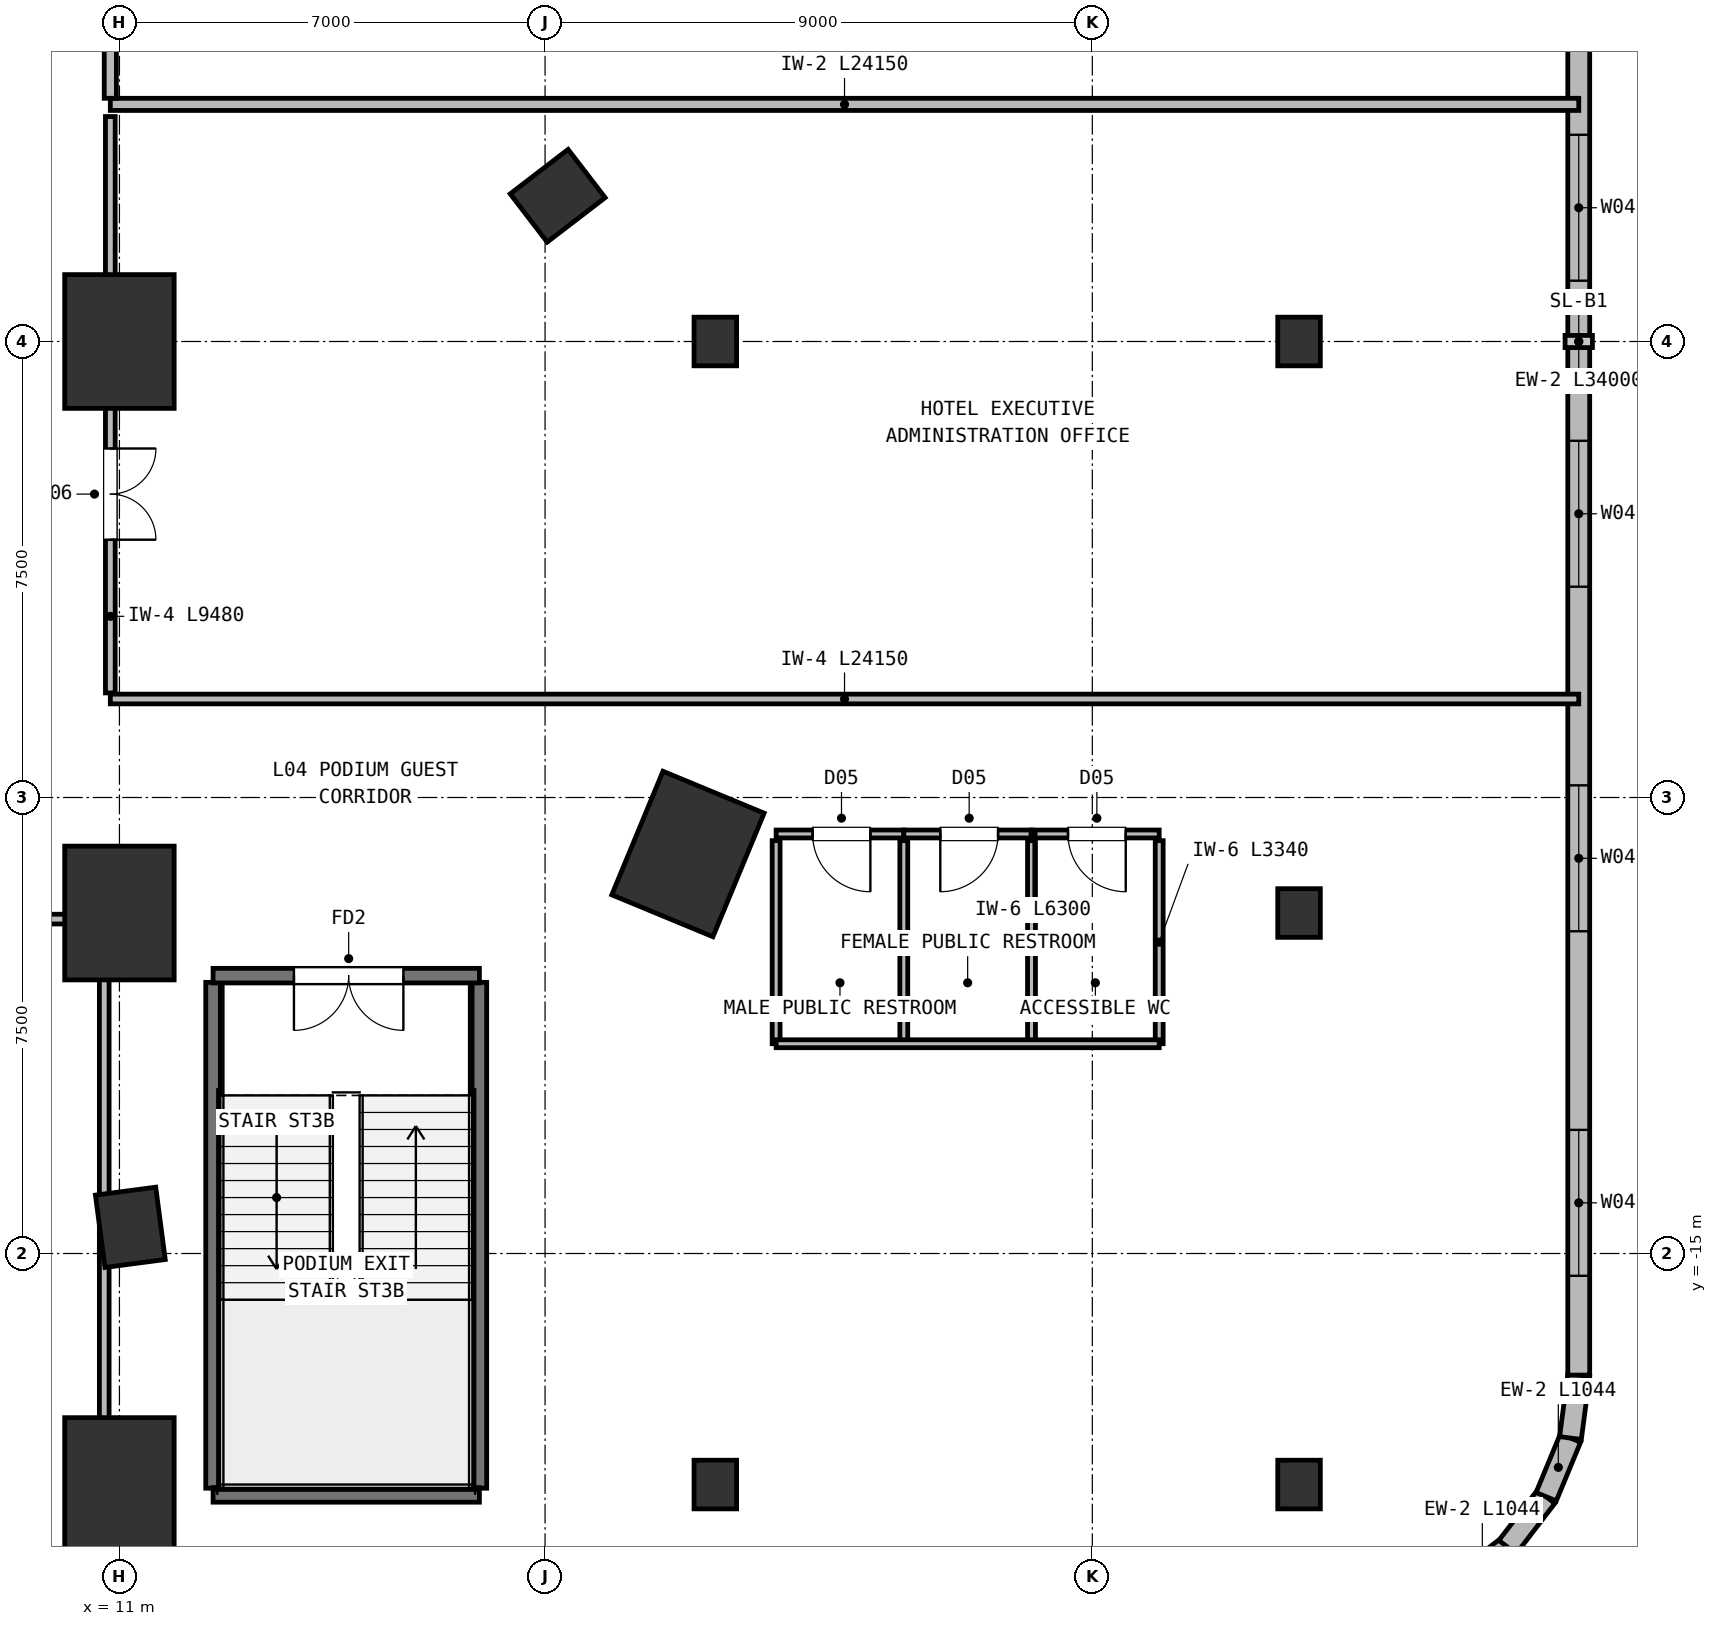
"""IFC4 building model, lengths in metres.
Left out: names, types, materials, properties, quantities, classifications, styles, units other than length and angle.
Written with IfcOpenShell. Run it as: python <this file> out.ifc"""

import sys

from ifc_helpers import new_model, si_unit, direction, frame, frame_2d, origin, origin_2d, place, context, subcontext, project, spatial, rectangle, extrude, element, fill, save


model = new_model("IFC4")
c1 = context("Model", 3, precision=1e-05, world=origin(), true_north=direction((0.0, 1.0)))
c2 = subcontext(c1, "Body", "Model", "MODEL_VIEW")
j1 = project(units=[si_unit("LENGTHUNIT", "METRE"), si_unit("PLANEANGLEUNIT", "RADIAN")], contexts=[c1])
p1 = place(None, origin())
s1 = spatial("IfcSite", under=j1, at=p1, CompositionType="ELEMENT")
p2 = place(p1, origin())
s2 = spatial("IfcBuilding", under=s1, at=p2, CompositionType="ELEMENT")
p3 = place(p2, frame((0.0, 0.0, 21.5)))
s3 = spatial("IfcBuildingStorey", under=s2, at=p3, CompositionType="ELEMENT", Elevation=21.5)
p4 = place(p3, frame((11.179, -14.569, 0.0), z_axis=(0.0, 0.0, 1.0), x_axis=(0.991444861374, 0.13052619222, 0.0)))
e1 = element("IfcColumn", 1, at=p4, inside=s3, PredefinedType="COLUMN", context=c2, shape_type="SweptSolid", body=[
    extrude(rectangle(XDim=1.0, YDim=1.2, at=origin_2d()), origin(), (0.0, 0.0, 1.0), 4.5),
])
p5 = place(p3, frame((20.35, -8.429, 0.0), z_axis=(0.0, 0.0, 1.0), x_axis=(-0.923879532511, 0.382683432365, 0.0)))
e2 = element("IfcColumn", 2, at=p5, inside=s3, PredefinedType="COLUMN", context=c2, shape_type="SweptSolid", body=[
    extrude(rectangle(XDim=1.8, YDim=2.2, at=origin_2d()), origin(), (0.0, 0.0, 1.0), 4.5),
])
p6 = place(p3, frame((18.207, 2.397, 0.0), z_axis=(0.0, 0.0, 1.0), x_axis=(-0.608761429009, 0.793353340291, 0.0)))
e3 = element("IfcColumn", 3, at=p6, inside=s3, PredefinedType="COLUMN", context=c2, shape_type="SweptSolid", body=[
    extrude(rectangle(XDim=1.0, YDim=1.2, at=origin_2d()), origin(), (0.0, 0.0, 1.0), 4.5),
])
for number, where, z_axis, x_axis in (
    (4, (11.0, -18.8, 0.0), (0.0, 0.0, 1.0), (1.0, 0.0, 0.0)),
    (5, (11.0, -9.4, 0.0), (0.0, 0.0, 1.0), (1.0, 0.0, 0.0)),
    (6, (11.0, 0.0, 0.0), (0.0, 0.0, 1.0), (1.0, 0.0, 0.0)),
):
    element("IfcColumn", number, at=place(p3, frame(where, z_axis=z_axis, x_axis=x_axis)), inside=s3, PredefinedType="COLUMN", context=c2, shape_type="SweptSolid", body=[
        extrude(rectangle(XDim=1.8, YDim=2.2, at=origin_2d()), origin(), (0.0, 0.0, 1.0), 4.5),
    ])
for number, where, z_axis, x_axis in (
    (7, (20.8, -18.8, 0.0), (0.0, 0.0, 1.0), (1.0, 0.0, 0.0)),
    (8, (20.8, 0.0, 0.0), (0.0, 0.0, 1.0), (1.0, 0.0, 0.0)),
    (9, (30.4, -18.8, 0.0), (0.0, 0.0, 1.0), (1.0, 0.0, 0.0)),
    (10, (30.4, -9.4, 0.0), (0.0, 0.0, 1.0), (1.0, 0.0, 0.0)),
    (11, (30.4, 0.0, 0.0), (0.0, 0.0, 1.0), (1.0, 0.0, 0.0)),
):
    element("IfcColumn", number, at=place(p3, frame(where, z_axis=z_axis, x_axis=x_axis)), inside=s3, PredefinedType="COLUMN", context=c2, shape_type="SweptSolid", body=[
        extrude(rectangle(XDim=0.7, YDim=0.8, at=origin_2d()), origin(), (0.0, 0.0, 1.0), 4.5),
    ])
for number, where, z_axis, x_axis in (
    (12, (33.828, -19.828, 0.0), (0.0, 0.0, 1.0), (-0.793, -0.609, 0.0)),
    (13, (34.464, -19.0, 0.0), (0.0, 0.0, 1.0), (-0.609, -0.793, 0.0)),
    (14, (34.864, -18.035, 0.0), (0.0, 0.0, 1.0), (-0.383, -0.924, 0.0)),
):
    element("IfcWall", number, at=place(p3, frame(where, z_axis=z_axis, x_axis=x_axis)), inside=s3, PredefinedType="SOLIDWALL", context=c2, shape_type="SweptSolid", body=[
        extrude(rectangle(XDim=1.044, YDim=0.36, at=frame_2d((0.522, 0.0))), origin(), (0.0, 0.0, 1.0), 4.22),
    ])
p7 = place(p3, frame((35.0, -17.0, 0.0), z_axis=(0.0, 0.0, 1.0), x_axis=(-0.130448465198, -0.991455091231, 0.0)))
e15 = element("IfcWall", 15, at=p7, inside=s3, PredefinedType="SOLIDWALL", context=c2, shape_type="SweptSolid", body=[
    extrude(rectangle(XDim=1.044, YDim=0.36, at=frame_2d((0.522, 0.0))), origin(), (0.0, 0.0, 1.0), 4.22),
])
p8 = place(p3, frame((35.0, 17.0, 0.0), z_axis=(0.0, 0.0, 1.0), x_axis=(0.0, -1.0, 0.0)))
e16 = element("IfcWall", 16, at=p8, inside=s3, PredefinedType="SOLIDWALL", context=c2, shape_type="SweptSolid", body=[
    extrude(rectangle(XDim=34.0, YDim=0.36, at=frame_2d((17.0, 0.0))), origin(), (0.0, 0.0, 1.0), 4.22),
])
p9 = place(p8, frame((1.633, 0.0, 0.95)))
e17 = element("IfcOpeningElement", 17, at=p9, cuts=e16, PredefinedType="OPENING", context=c2, shape_type="SweptSolid", body=[
    extrude(rectangle(XDim=2.4, YDim=2.6, at=frame_2d((1.2, 1.3))), frame((0.0, 0.19, 0.0), z_axis=(0.0, -1.0, 0.0), x_axis=(1.0, 0.0, 0.0)), (0.0, 0.0, 1.0), 0.38),
])
p10 = place(p8, frame((7.3, 0.0, 0.95)))
e18 = element("IfcOpeningElement", 18, at=p10, cuts=e16, PredefinedType="OPENING", context=c2, shape_type="SweptSolid", body=[
    extrude(rectangle(XDim=2.4, YDim=2.6, at=frame_2d((1.2, 1.3))), frame((0.0, 0.19, 0.0), z_axis=(0.0, -1.0, 0.0), x_axis=(1.0, 0.0, 0.0)), (0.0, 0.0, 1.0), 0.38),
])
p11 = place(p8, frame((13.6, 0.0, 0.95)))
e19 = element("IfcOpeningElement", 19, at=p11, cuts=e16, PredefinedType="OPENING", context=c2, shape_type="SweptSolid", body=[
    extrude(rectangle(XDim=2.4, YDim=2.6, at=frame_2d((1.2, 1.3))), frame((0.0, 0.19, 0.0), z_axis=(0.0, -1.0, 0.0), x_axis=(1.0, 0.0, 0.0)), (0.0, 0.0, 1.0), 0.38),
])
p12 = place(p8, frame((18.633, 0.0, 0.95)))
e20 = element("IfcOpeningElement", 20, at=p12, cuts=e16, PredefinedType="OPENING", context=c2, shape_type="SweptSolid", body=[
    extrude(rectangle(XDim=2.4, YDim=2.6, at=frame_2d((1.2, 1.3))), frame((0.0, 0.19, 0.0), z_axis=(0.0, -1.0, 0.0), x_axis=(1.0, 0.0, 0.0)), (0.0, 0.0, 1.0), 0.38),
])
p13 = place(p8, frame((24.3, 0.0, 0.95)))
e21 = element("IfcOpeningElement", 21, at=p13, cuts=e16, PredefinedType="OPENING", context=c2, shape_type="SweptSolid", body=[
    extrude(rectangle(XDim=2.4, YDim=2.6, at=frame_2d((1.2, 1.3))), frame((0.0, 0.19, 0.0), z_axis=(0.0, -1.0, 0.0), x_axis=(1.0, 0.0, 0.0)), (0.0, 0.0, 1.0), 0.38),
])
p14 = place(p8, frame((29.967, 0.0, 0.95)))
e22 = element("IfcOpeningElement", 22, at=p14, cuts=e16, PredefinedType="OPENING", context=c2, shape_type="SweptSolid", body=[
    extrude(rectangle(XDim=2.4, YDim=2.6, at=frame_2d((1.2, 1.3))), frame((0.0, 0.19, 0.0), z_axis=(0.0, -1.0, 0.0), x_axis=(1.0, 0.0, 0.0)), (0.0, 0.0, 1.0), 0.38),
])
for number, where, z_axis, x_axis in (
    (23, (12.54, -18.86, 0.0), (0.0, 0.0, 1.0), (0.0, 1.0, 0.0)),
    (24, (16.92, -18.86, 0.0), (0.0, 0.0, 1.0), (0.0, 1.0, 0.0)),
):
    element("IfcWall", number, at=place(p3, frame(where, z_axis=z_axis, x_axis=x_axis)), inside=s3, PredefinedType="SHEAR", context=c2, shape_type="SweptSolid", body=[
        extrude(rectangle(XDim=8.32, YDim=0.24, at=frame_2d((4.16, 0.0))), origin(), (0.0, 0.0, 1.0), 4.22),
    ])
p15 = place(p3, frame((12.54, -18.97, 0.0), z_axis=(0.0, 0.0, 1.0), x_axis=(1.0, 0.0, 0.0)))
e25 = element("IfcWall", 25, at=p15, inside=s3, PredefinedType="SHEAR", context=c2, shape_type="SweptSolid", body=[
    extrude(rectangle(XDim=4.38, YDim=0.24, at=frame_2d((2.19, 0.0))), origin(), (0.0, 0.0, 1.0), 4.22),
])
p16 = place(p3, frame((16.92, -10.43, 0.0), z_axis=(0.0, 0.0, 1.0), x_axis=(-1.0, 0.0, 0.0)))
e26 = element("IfcWall", 26, at=p16, inside=s3, PredefinedType="SHEAR", context=c2, shape_type="SweptSolid", body=[
    extrude(rectangle(XDim=4.38, YDim=0.24, at=frame_2d((2.19, 0.0))), origin(), (0.0, 0.0, 1.0), 4.22),
])
p17 = place(p16, frame((1.25, 0.0, 0.0)))
e27 = element("IfcOpeningElement", 27, at=p17, cuts=e26, PredefinedType="OPENING", context=c2, shape_type="SweptSolid", body=[
    extrude(rectangle(XDim=1.8, YDim=2.2, at=frame_2d((0.9, 1.1))), frame((0.0, 0.13, 0.0), z_axis=(0.0, -1.0, 0.0), x_axis=(1.0, 0.0, 0.0)), (0.0, 0.0, 1.0), 0.26),
])
p18 = place(p3, frame((23.9, -8.1, 0.0), z_axis=(0.0, 0.0, 1.0), x_axis=(-1.0, 0.0, 0.0)))
e28 = element("IfcWall", 28, at=p18, inside=s3, PredefinedType="PARTITIONING", context=c2, shape_type="SweptSolid", body=[
    extrude(rectangle(XDim=2.1, YDim=0.13, at=frame_2d((1.05, 0.0))), origin(), (0.0, 0.0, 1.0), 4.22),
])
p19 = place(p18, frame((0.55, 0.0, 0.0)))
e29 = element("IfcOpeningElement", 29, at=p19, cuts=e28, PredefinedType="OPENING", context=c2, shape_type="SweptSolid", body=[
    extrude(rectangle(XDim=0.95, YDim=2.1, at=frame_2d((0.475, 1.05))), frame((0.0, 0.075, 0.0), z_axis=(0.0, -1.0, 0.0), x_axis=(1.0, 0.0, 0.0)), (0.0, 0.0, 1.0), 0.15),
])
p20 = place(p3, frame((21.8, -11.55, 0.0), z_axis=(0.0, 0.0, 1.0), x_axis=(0.0, 1.0, 0.0)))
e30 = element("IfcWall", 30, at=p20, inside=s3, PredefinedType="PARTITIONING", context=c2, shape_type="SweptSolid", body=[
    extrude(rectangle(XDim=3.34, YDim=0.13, at=frame_2d((1.67, 0.0))), origin(), (0.0, 0.0, 1.0), 4.22),
])
p21 = place(p3, frame((26.0, -8.1, 0.0), z_axis=(0.0, 0.0, 1.0), x_axis=(-1.0, 0.0, 0.0)))
e31 = element("IfcWall", 31, at=p21, inside=s3, PredefinedType="PARTITIONING", context=c2, shape_type="SweptSolid", body=[
    extrude(rectangle(XDim=2.1, YDim=0.13, at=frame_2d((1.05, 0.0))), origin(), (0.0, 0.0, 1.0), 4.22),
])
p22 = place(p21, frame((0.55, 0.0, 0.0)))
e32 = element("IfcOpeningElement", 32, at=p22, cuts=e31, PredefinedType="OPENING", context=c2, shape_type="SweptSolid", body=[
    extrude(rectangle(XDim=0.95, YDim=2.1, at=frame_2d((0.475, 1.05))), frame((0.0, 0.075, 0.0), z_axis=(0.0, -1.0, 0.0), x_axis=(1.0, 0.0, 0.0)), (0.0, 0.0, 1.0), 0.15),
])
p23 = place(p3, frame((23.9, -11.55, 0.0), z_axis=(0.0, 0.0, 1.0), x_axis=(0.0, 1.0, 0.0)))
e33 = element("IfcWall", 33, at=p23, inside=s3, PredefinedType="PARTITIONING", context=c2, shape_type="SweptSolid", body=[
    extrude(rectangle(XDim=3.34, YDim=0.13, at=frame_2d((1.67, 0.0))), origin(), (0.0, 0.0, 1.0), 4.22),
])
p24 = place(p3, frame((28.1, -8.1, 0.0), z_axis=(0.0, 0.0, 1.0), x_axis=(-1.0, 0.0, 0.0)))
e34 = element("IfcWall", 34, at=p24, inside=s3, PredefinedType="PARTITIONING", context=c2, shape_type="SweptSolid", body=[
    extrude(rectangle(XDim=2.1, YDim=0.13, at=frame_2d((1.05, 0.0))), origin(), (0.0, 0.0, 1.0), 4.22),
])
p25 = place(p24, frame((0.55, 0.0, 0.0)))
e35 = element("IfcOpeningElement", 35, at=p25, cuts=e34, PredefinedType="OPENING", context=c2, shape_type="SweptSolid", body=[
    extrude(rectangle(XDim=0.95, YDim=2.1, at=frame_2d((0.475, 1.05))), frame((0.0, 0.075, 0.0), z_axis=(0.0, -1.0, 0.0), x_axis=(1.0, 0.0, 0.0)), (0.0, 0.0, 1.0), 0.15),
])
for number, where, z_axis, x_axis in (
    (36, (26.0, -11.55, 0.0), (0.0, 0.0, 1.0), (0.0, 1.0, 0.0)),
    (37, (28.1, -11.55, 0.0), (0.0, 0.0, 1.0), (0.0, 1.0, 0.0)),
):
    element("IfcWall", number, at=place(p3, frame(where, z_axis=z_axis, x_axis=x_axis)), inside=s3, PredefinedType="PARTITIONING", context=c2, shape_type="SweptSolid", body=[
        extrude(rectangle(XDim=3.34, YDim=0.13, at=frame_2d((1.67, 0.0))), origin(), (0.0, 0.0, 1.0), 4.22),
    ])
p26 = place(p3, frame((21.8, -11.55, 0.0), z_axis=(0.0, 0.0, 1.0), x_axis=(1.0, 0.0, 0.0)))
e38 = element("IfcWall", 38, at=p26, inside=s3, PredefinedType="PARTITIONING", context=c2, shape_type="SweptSolid", body=[
    extrude(rectangle(XDim=6.3, YDim=0.13, at=frame_2d((3.15, 0.0))), origin(), (0.0, 0.0, 1.0), 4.22),
])
p27 = place(p3, frame((10.75, -9.5, 0.0), z_axis=(0.0, 0.0, 1.0), x_axis=(-1.0, 0.0, 0.0)))
e39 = element("IfcWall", 39, at=p27, inside=s3, PredefinedType="PARTITIONING", context=c2, shape_type="SweptSolid", body=[
    extrude(rectangle(XDim=21.5, YDim=0.16, at=frame_2d((10.75, 0.0))), origin(), (0.0, 0.0, 1.0), 3.3),
])
p28 = place(p27, frame((13.8, 0.0, 0.0)))
e40 = element("IfcOpeningElement", 40, at=p28, cuts=e39, PredefinedType="OPENING", context=c2, shape_type="SweptSolid", body=[
    extrude(rectangle(XDim=1.5, YDim=2.2, at=frame_2d((0.75, 1.1))), frame((0.0, 0.09, 0.0), z_axis=(0.0, -1.0, 0.0), x_axis=(1.0, 0.0, 0.0)), (0.0, 0.0, 1.0), 0.18),
])
p29 = place(p3, frame((10.75, -20.9, 0.0), z_axis=(0.0, 0.0, 1.0), x_axis=(0.0, 1.0, 0.0)))
e41 = element("IfcWall", 41, at=p29, inside=s3, PredefinedType="PARTITIONING", context=c2, shape_type="SweptSolid", body=[
    extrude(rectangle(XDim=11.3, YDim=0.16, at=frame_2d((5.65, 0.0))), origin(), (0.0, 0.0, 1.0), 4.22),
])
p30 = place(p3, frame((10.85, 3.9, 0.0), z_axis=(0.0, 0.0, 1.0), x_axis=(1.0, 0.0, 0.0)))
e42 = element("IfcWall", 42, at=p30, inside=s3, PredefinedType="PARTITIONING", context=c2, shape_type="SweptSolid", body=[
    extrude(rectangle(XDim=24.15, YDim=0.2, at=frame_2d((12.075, 0.0))), origin(), (0.0, 0.0, 1.0), 4.22),
])
p31 = place(p3, frame((10.85, 20.9, 0.0), z_axis=(0.0, 0.0, 1.0), x_axis=(0.0, -1.0, 0.0)))
e43 = element("IfcWall", 43, at=p31, inside=s3, PredefinedType="PARTITIONING", context=c2, shape_type="SweptSolid", body=[
    extrude(rectangle(XDim=16.9, YDim=0.2, at=frame_2d((8.45, 0.0))), origin(), (0.0, 0.0, 1.0), 3.6),
])
p32 = place(p31, frame((13.8, 0.0, 0.0)))
e44 = element("IfcOpeningElement", 44, at=p32, cuts=e43, PredefinedType="OPENING", context=c2, shape_type="SweptSolid", body=[
    extrude(rectangle(XDim=1.8, YDim=2.2, at=frame_2d((0.9, 1.1))), frame((0.0, 0.11, 0.0), z_axis=(0.0, -1.0, 0.0), x_axis=(1.0, 0.0, 0.0)), (0.0, 0.0, 1.0), 0.22),
])
p33 = place(p3, frame((10.85, -5.88, 0.0), z_axis=(0.0, 0.0, 1.0), x_axis=(1.0, 0.0, 0.0)))
e45 = element("IfcWall", 45, at=p33, inside=s3, PredefinedType="PARTITIONING", context=c2, shape_type="SweptSolid", body=[
    extrude(rectangle(XDim=24.15, YDim=0.16, at=frame_2d((12.075, 0.0))), origin(), (0.0, 0.0, 1.0), 4.22),
])
p34 = place(p3, frame((10.85, 3.7, 0.0), z_axis=(0.0, 0.0, 1.0), x_axis=(0.0, -1.0, 0.0)))
e46 = element("IfcWall", 46, at=p34, inside=s3, PredefinedType="PARTITIONING", context=c2, shape_type="SweptSolid", body=[
    extrude(rectangle(XDim=9.48, YDim=0.16, at=frame_2d((4.74, 0.0))), origin(), (0.0, 0.0, 1.0), 3.6),
])
p35 = place(p34, frame((5.46, 0.0, 0.0)))
e47 = element("IfcOpeningElement", 47, at=p35, cuts=e46, PredefinedType="OPENING", context=c2, shape_type="SweptSolid", body=[
    extrude(rectangle(XDim=1.5, YDim=2.2, at=frame_2d((0.75, 1.1))), frame((0.0, 0.09, 0.0), z_axis=(0.0, -1.0, 0.0), x_axis=(1.0, 0.0, 0.0)), (0.0, 0.0, 1.0), 0.18),
])
p36 = place(p11, origin())
e48 = element("IfcWindow", 48, at=p36, inside=s3, PartitioningType="SINGLE_PANEL", PredefinedType="WINDOW", context=c2, shape_type="SweptSolid", body=[
    extrude(rectangle(XDim=2.4, YDim=2.6, at=frame_2d((1.2, 1.3))), frame((0.0, 0.03, 0.0), z_axis=(0.0, -1.0, 0.0), x_axis=(1.0, 0.0, 0.0)), (0.0, 0.0, 1.0), 0.06),
])
fill(e19, e48)
p37 = place(p12, origin())
e49 = element("IfcWindow", 49, at=p37, inside=s3, PartitioningType="SINGLE_PANEL", PredefinedType="WINDOW", context=c2, shape_type="SweptSolid", body=[
    extrude(rectangle(XDim=2.4, YDim=2.6, at=frame_2d((1.2, 1.3))), frame((0.0, 0.03, 0.0), z_axis=(0.0, -1.0, 0.0), x_axis=(1.0, 0.0, 0.0)), (0.0, 0.0, 1.0), 0.06),
])
fill(e20, e49)
p38 = place(p13, origin())
e50 = element("IfcWindow", 50, at=p38, inside=s3, PartitioningType="SINGLE_PANEL", PredefinedType="WINDOW", context=c2, shape_type="SweptSolid", body=[
    extrude(rectangle(XDim=2.4, YDim=2.6, at=frame_2d((1.2, 1.3))), frame((0.0, 0.03, 0.0), z_axis=(0.0, -1.0, 0.0), x_axis=(1.0, 0.0, 0.0)), (0.0, 0.0, 1.0), 0.06),
])
fill(e21, e50)
p39 = place(p14, origin())
e51 = element("IfcWindow", 51, at=p39, inside=s3, PartitioningType="SINGLE_PANEL", PredefinedType="WINDOW", context=c2, shape_type="SweptSolid", body=[
    extrude(rectangle(XDim=2.4, YDim=2.6, at=frame_2d((1.2, 1.3))), frame((0.0, 0.03, 0.0), z_axis=(0.0, -1.0, 0.0), x_axis=(1.0, 0.0, 0.0)), (0.0, 0.0, 1.0), 0.06),
])
fill(e22, e51)
p40 = place(p17, origin())
e52 = element("IfcDoor", 52, at=p40, inside=s3, OperationType="DOUBLE_DOOR_SINGLE_SWING", PredefinedType="DOOR", context=c2, shape_type="SweptSolid", body=[
    extrude(rectangle(XDim=1.8, YDim=2.2, at=frame_2d((0.9, 1.1))), frame((0.0, 0.025, 0.0), z_axis=(0.0, -1.0, 0.0), x_axis=(1.0, 0.0, 0.0)), (0.0, 0.0, 1.0), 0.05),
])
fill(e27, e52)
p41 = place(p19, origin())
e53 = element("IfcDoor", 53, at=p41, inside=s3, OperationType="SINGLE_SWING_LEFT", PredefinedType="DOOR", context=c2, shape_type="SweptSolid", body=[
    extrude(rectangle(XDim=0.95, YDim=2.1, at=frame_2d((0.475, 1.05))), frame((0.0, 0.025, 0.0), z_axis=(0.0, -1.0, 0.0), x_axis=(1.0, 0.0, 0.0)), (0.0, 0.0, 1.0), 0.05),
])
fill(e29, e53)
p42 = place(p22, origin())
e54 = element("IfcDoor", 54, at=p42, inside=s3, OperationType="SINGLE_SWING_RIGHT", PredefinedType="DOOR", context=c2, shape_type="SweptSolid", body=[
    extrude(rectangle(XDim=0.95, YDim=2.1, at=frame_2d((0.475, 1.05))), frame((0.0, 0.025, 0.0), z_axis=(0.0, -1.0, 0.0), x_axis=(1.0, 0.0, 0.0)), (0.0, 0.0, 1.0), 0.05),
])
fill(e32, e54)
p43 = place(p25, origin())
e55 = element("IfcDoor", 55, at=p43, inside=s3, OperationType="SINGLE_SWING_LEFT", PredefinedType="DOOR", context=c2, shape_type="SweptSolid", body=[
    extrude(rectangle(XDim=0.95, YDim=2.1, at=frame_2d((0.475, 1.05))), frame((0.0, 0.025, 0.0), z_axis=(0.0, -1.0, 0.0), x_axis=(1.0, 0.0, 0.0)), (0.0, 0.0, 1.0), 0.05),
])
fill(e35, e55)
p44 = place(p35, origin())
e56 = element("IfcDoor", 56, at=p44, inside=s3, OperationType="DOUBLE_DOOR_SINGLE_SWING", PredefinedType="DOOR", context=c2, shape_type="SweptSolid", body=[
    extrude(rectangle(XDim=1.5, YDim=2.2, at=frame_2d((0.75, 1.1))), frame((0.0, 0.025, 0.0), z_axis=(0.0, -1.0, 0.0), x_axis=(1.0, 0.0, 0.0)), (0.0, 0.0, 1.0), 0.05),
])
fill(e47, e56)
save(model, sys.argv[1])
